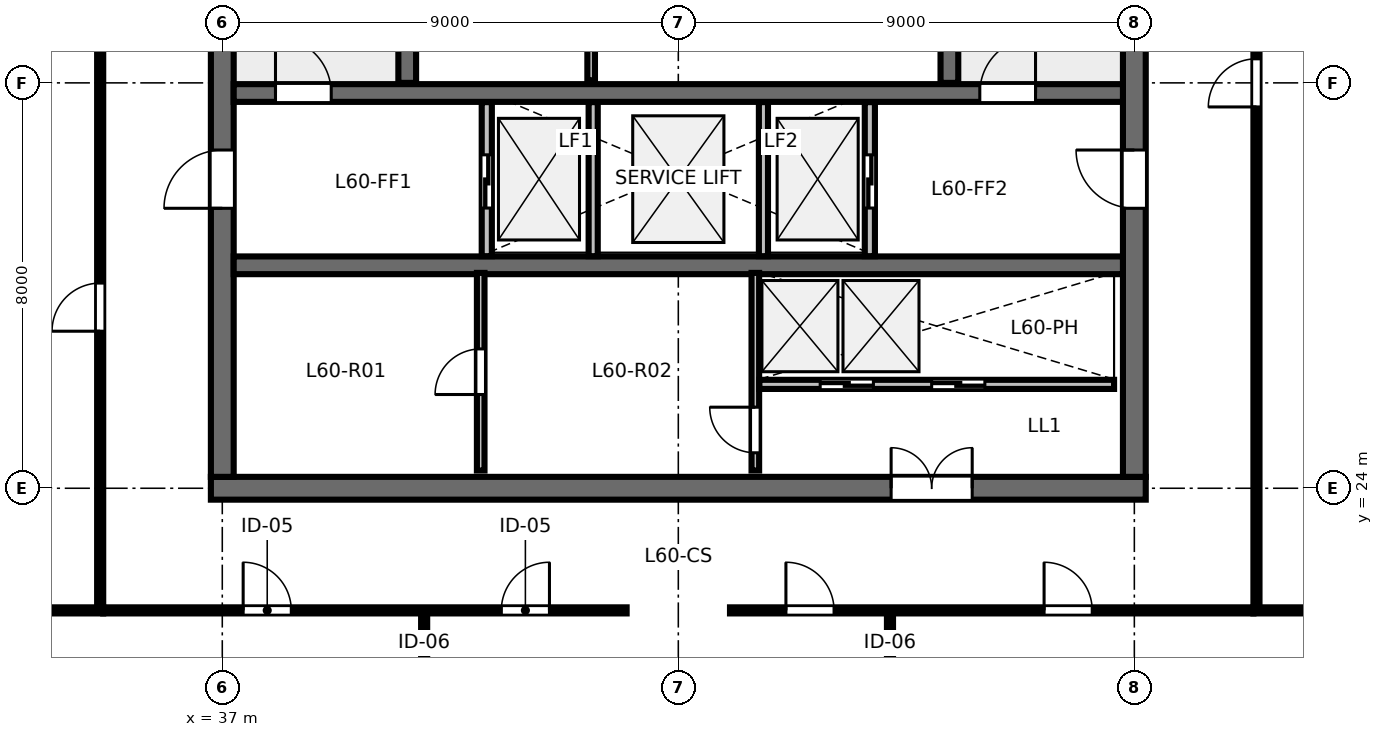
"""IFC4 building model, lengths in metres.
Left out: names, types, materials, properties, quantities, classifications, styles, units other than length and angle.
Written with IfcOpenShell. Run it as: python <this file> out.ifc"""

import sys

from ifc_helpers import new_model, si_unit, direction, frame, frame_2d, origin, place, context, subcontext, project, spatial, rectangle, extrude, element, fill, save


model = new_model("IFC4")
c1 = context("Model", 3, precision=1e-05, world=origin(), true_north=direction((0.0, 1.0)))
c2 = subcontext(c1, "Body", "Model", "MODEL_VIEW")
j1 = project(units=[si_unit("LENGTHUNIT", "METRE"), si_unit("PLANEANGLEUNIT", "RADIAN")], contexts=[c1])
p1 = place(None, origin())
s1 = spatial("IfcSite", under=j1, at=p1, CompositionType="ELEMENT")
p2 = place(p1, origin())
s2 = spatial("IfcBuilding", under=s1, at=p2, CompositionType="ELEMENT")
p3 = place(p2, frame((0.0, 0.0, 227.4)))
s3 = spatial("IfcBuildingStorey", under=s2, at=p3, CompositionType="ELEMENT", Elevation=227.4)
p4 = place(p3, frame((36.775, 24.0, 0.0), z_axis=(0.0, 0.0, 1.0), x_axis=(1.0, 0.0, 0.0)))
e1 = element("IfcWall", 1, at=p4, inside=s3, PredefinedType="SHEAR", context=c2, shape_type="SweptSolid", body=[
    extrude(rectangle(XDim=18.45, YDim=0.45, at=frame_2d((9.225, 0.0))), origin(), (0.0, 0.0, 1.0), 3.36),
])
p5 = place(p4, frame((13.425, 0.0, 0.0)))
e2 = element("IfcOpeningElement", 2, at=p5, cuts=e1, PredefinedType="OPENING", context=c2, shape_type="SweptSolid", body=[
    extrude(rectangle(XDim=1.6, YDim=2.15, at=frame_2d((0.8, 1.075))), frame((0.0, 0.235, 0.0), z_axis=(0.0, -1.0, 0.0), x_axis=(1.0, 0.0, 0.0)), (0.0, 0.0, 1.0), 0.47),
])
p6 = place(p3, frame((37.0, 24.225, 0.0), z_axis=(0.0, 0.0, 1.0), x_axis=(0.0, 1.0, 0.0)))
e3 = element("IfcWall", 3, at=p6, inside=s3, PredefinedType="SHEAR", context=c2, shape_type="SweptSolid", body=[
    extrude(rectangle(XDim=15.55, YDim=0.45, at=frame_2d((7.775, 0.0))), origin(), (0.0, 0.0, 1.0), 3.36),
])
p7 = place(p6, frame((5.3, 0.0, 0.0)))
e4 = element("IfcOpeningElement", 4, at=p7, cuts=e3, PredefinedType="OPENING", context=c2, shape_type="SweptSolid", body=[
    extrude(rectangle(XDim=1.15, YDim=2.15, at=frame_2d((0.575, 1.075))), frame((0.0, 0.235, 0.0), z_axis=(0.0, -1.0, 0.0), x_axis=(1.0, 0.0, 0.0)), (0.0, 0.0, 1.0), 0.47),
])
p8 = place(p3, frame((55.0, 24.225, 0.0), z_axis=(0.0, 0.0, 1.0), x_axis=(0.0, 1.0, 0.0)))
e5 = element("IfcWall", 5, at=p8, inside=s3, PredefinedType="SHEAR", context=c2, shape_type="SweptSolid", body=[
    extrude(rectangle(XDim=15.55, YDim=0.45, at=frame_2d((7.775, 0.0))), origin(), (0.0, 0.0, 1.0), 3.36),
])
p9 = place(p8, frame((5.3, 0.0, 0.0)))
e6 = element("IfcOpeningElement", 6, at=p9, cuts=e5, PredefinedType="OPENING", context=c2, shape_type="SweptSolid", body=[
    extrude(rectangle(XDim=1.15, YDim=2.15, at=frame_2d((0.575, 1.075))), frame((0.0, 0.235, 0.0), z_axis=(0.0, -1.0, 0.0), x_axis=(1.0, 0.0, 0.0)), (0.0, 0.0, 1.0), 0.47),
])
p10 = place(p3, frame((37.225, 31.8, 0.0), z_axis=(0.0, 0.0, 1.0), x_axis=(1.0, 0.0, 0.0)))
e7 = element("IfcWall", 7, at=p10, inside=s3, PredefinedType="SHEAR", context=c2, shape_type="SweptSolid", body=[
    extrude(rectangle(XDim=17.55, YDim=0.35, at=frame_2d((8.775, 0.0))), origin(), (0.0, 0.0, 1.0), 3.36),
])
p11 = place(p10, frame((0.825, 0.0, 0.0)))
e8 = element("IfcOpeningElement", 8, at=p11, cuts=e7, PredefinedType="OPENING", context=c2, shape_type="SweptSolid", body=[
    extrude(rectangle(XDim=1.1, YDim=2.15, at=frame_2d((0.55, 1.075))), frame((0.0, 0.185, 0.0), z_axis=(0.0, -1.0, 0.0), x_axis=(1.0, 0.0, 0.0)), (0.0, 0.0, 1.0), 0.37),
])
p12 = place(p10, frame((14.725, 0.0, 0.0)))
e9 = element("IfcOpeningElement", 9, at=p12, cuts=e7, PredefinedType="OPENING", context=c2, shape_type="SweptSolid", body=[
    extrude(rectangle(XDim=1.1, YDim=2.15, at=frame_2d((0.55, 1.075))), frame((0.0, 0.185, 0.0), z_axis=(0.0, -1.0, 0.0), x_axis=(1.0, 0.0, 0.0)), (0.0, 0.0, 1.0), 0.37),
])
p13 = place(p3, frame((37.225, 28.4, 0.0), z_axis=(0.0, 0.0, 1.0), x_axis=(1.0, 0.0, 0.0)))
e10 = element("IfcWall", 10, at=p13, inside=s3, PredefinedType="SHEAR", context=c2, shape_type="SweptSolid", body=[
    extrude(rectangle(XDim=17.55, YDim=0.35, at=frame_2d((8.775, 0.0))), origin(), (0.0, 0.0, 1.0), 3.36),
])
for number, where, z_axis, x_axis in (
    (11, (40.65, 32.0, 0.0), (0.0, 0.0, 1.0), (0.0, 1.0, 0.0)),
    (12, (51.35, 32.0, 0.0), (0.0, 0.0, 1.0), (0.0, 1.0, 0.0)),
):
    element("IfcWall", number, at=place(p3, frame(where, z_axis=z_axis, x_axis=x_axis)), inside=s3, PredefinedType="SHEAR", context=c2, shape_type="SweptSolid", body=[
        extrude(rectangle(XDim=7.7, YDim=0.35, at=frame_2d((3.85, 0.0))), origin(), (0.0, 0.0, 1.0), 3.6),
    ])
p14 = place(p3, frame((44.28, 32.05, 0.0), z_axis=(0.0, 0.0, 1.0), x_axis=(0.0, 1.0, 0.0)))
e13 = element("IfcWall", 13, at=p14, inside=s3, PredefinedType="PARTITIONING", context=c2, shape_type="SweptSolid", body=[
    extrude(rectangle(XDim=3.67, YDim=0.15, at=frame_2d((1.835, 0.0))), origin(), (0.0, 0.0, 1.0), 3.375),
])
p15 = place(p14, frame((1.35, 0.0, 0.0)))
e14 = element("IfcOpeningElement", 14, at=p15, cuts=e13, PredefinedType="OPENING", context=c2, shape_type="SweptSolid", body=[
    extrude(rectangle(XDim=0.92, YDim=2.15, at=frame_2d((0.46, 1.075))), frame((0.0, 0.085, 0.0), z_axis=(0.0, -1.0, 0.0), x_axis=(1.0, 0.0, 0.0)), (0.0, 0.0, 1.0), 0.17),
])
p16 = place(p3, frame((42.22, 28.58, 0.0), z_axis=(0.0, 0.0, 1.0), x_axis=(0.0, 1.0, 0.0)))
e15 = element("IfcWall", 15, at=p16, inside=s3, PredefinedType="PARTITIONING", context=c2, shape_type="SweptSolid", body=[
    extrude(rectangle(XDim=3.04, YDim=0.2, at=frame_2d((1.52, 0.0))), origin(), (0.0, 0.0, 1.0), 3.375),
])
p17 = place(p16, frame((0.95, 0.0, 0.0)))
e16 = element("IfcOpeningElement", 16, at=p17, cuts=e15, PredefinedType="OPENING", context=c2, shape_type="SweptSolid", body=[
    extrude(rectangle(XDim=1.05, YDim=2.15, at=frame_2d((0.525, 1.075))), frame((0.0, 0.11, 0.0), z_axis=(0.0, -1.0, 0.0), x_axis=(1.0, 0.0, 0.0)), (0.0, 0.0, 1.0), 0.22),
])
p18 = place(p3, frame((49.78, 28.58, 0.0), z_axis=(0.0, 0.0, 1.0), x_axis=(0.0, 1.0, 0.0)))
e17 = element("IfcWall", 17, at=p18, inside=s3, PredefinedType="PARTITIONING", context=c2, shape_type="SweptSolid", body=[
    extrude(rectangle(XDim=3.04, YDim=0.2, at=frame_2d((1.52, 0.0))), origin(), (0.0, 0.0, 1.0), 3.375),
])
p19 = place(p18, frame((0.95, 0.0, 0.0)))
e18 = element("IfcOpeningElement", 18, at=p19, cuts=e17, PredefinedType="OPENING", context=c2, shape_type="SweptSolid", body=[
    extrude(rectangle(XDim=1.05, YDim=2.15, at=frame_2d((0.525, 1.075))), frame((0.0, 0.11, 0.0), z_axis=(0.0, -1.0, 0.0), x_axis=(1.0, 0.0, 0.0)), (0.0, 0.0, 1.0), 0.22),
])
for number, where, z_axis, x_axis in (
    (19, (44.32, 28.58, 0.0), (0.0, 0.0, 1.0), (0.0, 1.0, 0.0)),
    (20, (47.68, 28.58, 0.0), (0.0, 0.0, 1.0), (0.0, 1.0, 0.0)),
):
    element("IfcWall", number, at=place(p3, frame(where, z_axis=z_axis, x_axis=x_axis)), inside=s3, PredefinedType="PARTITIONING", context=c2, shape_type="SweptSolid", body=[
        extrude(rectangle(XDim=3.04, YDim=0.18, at=frame_2d((1.52, 0.0))), origin(), (0.0, 0.0, 1.0), 3.375),
    ])
p20 = place(p3, frame((42.1, 24.35, 0.0), z_axis=(0.0, 0.0, 1.0), x_axis=(0.0, 1.0, 0.0)))
e21 = element("IfcWall", 21, at=p20, inside=s3, PredefinedType="PARTITIONING", context=c2, shape_type="SweptSolid", body=[
    extrude(rectangle(XDim=3.9, YDim=0.15, at=frame_2d((1.95, 0.0))), origin(), (0.0, 0.0, 1.0), 3.375),
])
p21 = place(p20, frame((1.5, 0.0, 0.0)))
e22 = element("IfcOpeningElement", 22, at=p21, cuts=e21, PredefinedType="OPENING", context=c2, shape_type="SweptSolid", body=[
    extrude(rectangle(XDim=0.9, YDim=2.15, at=frame_2d((0.45, 1.075))), frame((0.0, 0.085, 0.0), z_axis=(0.0, -1.0, 0.0), x_axis=(1.0, 0.0, 0.0)), (0.0, 0.0, 1.0), 0.17),
])
p22 = place(p3, frame((47.52, 24.35, 0.0), z_axis=(0.0, 0.0, 1.0), x_axis=(0.0, 1.0, 0.0)))
e23 = element("IfcWall", 23, at=p22, inside=s3, PredefinedType="PARTITIONING", context=c2, shape_type="SweptSolid", body=[
    extrude(rectangle(XDim=3.9, YDim=0.15, at=frame_2d((1.95, 0.0))), origin(), (0.0, 0.0, 1.0), 3.375),
])
p23 = place(p22, frame((0.35, 0.0, 0.0)))
e24 = element("IfcOpeningElement", 24, at=p23, cuts=e23, PredefinedType="OPENING", context=c2, shape_type="SweptSolid", body=[
    extrude(rectangle(XDim=0.9, YDim=2.15, at=frame_2d((0.45, 1.075))), frame((0.0, 0.085, 0.0), z_axis=(0.0, -1.0, 0.0), x_axis=(1.0, 0.0, 0.0)), (0.0, 0.0, 1.0), 0.17),
])
p24 = place(p3, frame((47.6, 26.05, 0.0), z_axis=(0.0, 0.0, 1.0), x_axis=(1.0, 0.0, 0.0)))
e25 = element("IfcWall", 25, at=p24, inside=s3, PredefinedType="PARTITIONING", context=c2, shape_type="SweptSolid", body=[
    extrude(rectangle(XDim=7.0, YDim=0.18, at=frame_2d((3.5, 0.0))), origin(), (0.0, 0.0, 1.0), 3.375),
])
p25 = place(p24, frame((1.2, 0.0, 0.0)))
e26 = element("IfcOpeningElement", 26, at=p25, cuts=e25, PredefinedType="OPENING", context=c2, shape_type="SweptSolid", body=[
    extrude(rectangle(XDim=1.05, YDim=2.15, at=frame_2d((0.525, 1.075))), frame((0.0, 0.1, 0.0), z_axis=(0.0, -1.0, 0.0), x_axis=(1.0, 0.0, 0.0)), (0.0, 0.0, 1.0), 0.2),
])
p26 = place(p24, frame((3.4, 0.0, 0.0)))
e27 = element("IfcOpeningElement", 27, at=p26, cuts=e25, PredefinedType="OPENING", context=c2, shape_type="SweptSolid", body=[
    extrude(rectangle(XDim=1.05, YDim=2.15, at=frame_2d((0.525, 1.075))), frame((0.0, 0.1, 0.0), z_axis=(0.0, -1.0, 0.0), x_axis=(1.0, 0.0, 0.0)), (0.0, 0.0, 1.0), 0.2),
])
p27 = place(p3, frame((40.984, 21.59, 0.0), z_axis=(0.0, 0.0, 1.0), x_axis=(0.0, -1.0, 0.0)))
e28 = element("IfcWall", 28, at=p27, inside=s3, PredefinedType="PARTITIONING", context=c2, shape_type="SweptSolid", body=[
    extrude(rectangle(XDim=7.137, YDim=0.12, at=frame_2d((3.569, 0.0))), origin(), (0.0, 0.0, 1.0), 2.655),
])
p28 = place(p27, frame((1.4, 0.0, 0.0)))
e29 = element("IfcOpeningElement", 29, at=p28, cuts=e28, PredefinedType="OPENING", context=c2, shape_type="SweptSolid", body=[
    extrude(rectangle(XDim=0.9, YDim=2.15, at=frame_2d((0.45, 1.075))), frame((0.0, 0.07, 0.0), z_axis=(0.0, -1.0, 0.0), x_axis=(1.0, 0.0, 0.0)), (0.0, 0.0, 1.0), 0.14),
])
p29 = place(p3, frame((50.177, 21.59, 0.0), z_axis=(0.0, 0.0, 1.0), x_axis=(0.0, -1.0, 0.0)))
e30 = element("IfcWall", 30, at=p29, inside=s3, PredefinedType="PARTITIONING", context=c2, shape_type="SweptSolid", body=[
    extrude(rectangle(XDim=7.137, YDim=0.12, at=frame_2d((3.569, 0.0))), origin(), (0.0, 0.0, 1.0), 2.655),
])
p30 = place(p29, frame((1.4, 0.0, 0.0)))
e31 = element("IfcOpeningElement", 31, at=p30, cuts=e30, PredefinedType="OPENING", context=c2, shape_type="SweptSolid", body=[
    extrude(rectangle(XDim=0.9, YDim=2.15, at=frame_2d((0.45, 1.075))), frame((0.0, 0.07, 0.0), z_axis=(0.0, -1.0, 0.0), x_axis=(1.0, 0.0, 0.0)), (0.0, 0.0, 1.0), 0.14),
])
p31 = place(p3, frame((34.65, 21.59, 0.0), z_axis=(0.0, 0.0, 1.0), x_axis=(1.0, 0.0, 0.0)))
e32 = element("IfcWall", 32, at=p31, inside=s3, PredefinedType="PARTITIONING", context=c2, shape_type="SweptSolid", body=[
    extrude(rectangle(XDim=10.33, YDim=0.12, at=frame_2d((5.165, 0.0))), origin(), (0.0, 0.0, 1.0), 2.655),
])
p32 = place(p31, frame((2.762, 0.0, 0.0)))
e33 = element("IfcOpeningElement", 33, at=p32, cuts=e32, PredefinedType="OPENING", context=c2, shape_type="SweptSolid", body=[
    extrude(rectangle(XDim=0.95, YDim=2.15, at=frame_2d((0.475, 1.075))), frame((0.0, 0.07, 0.0), z_axis=(0.0, -1.0, 0.0), x_axis=(1.0, 0.0, 0.0)), (0.0, 0.0, 1.0), 0.14),
])
p33 = place(p31, frame((7.857, 0.0, 0.0)))
e34 = element("IfcOpeningElement", 34, at=p33, cuts=e32, PredefinedType="OPENING", context=c2, shape_type="SweptSolid", body=[
    extrude(rectangle(XDim=0.95, YDim=2.15, at=frame_2d((0.475, 1.075))), frame((0.0, 0.07, 0.0), z_axis=(0.0, -1.0, 0.0), x_axis=(1.0, 0.0, 0.0)), (0.0, 0.0, 1.0), 0.14),
])
p34 = place(p3, frame((47.02, 21.59, 0.0), z_axis=(0.0, 0.0, 1.0), x_axis=(1.0, 0.0, 0.0)))
e35 = element("IfcWall", 35, at=p34, inside=s3, PredefinedType="PARTITIONING", context=c2, shape_type="SweptSolid", body=[
    extrude(rectangle(XDim=10.33, YDim=0.12, at=frame_2d((5.165, 0.0))), origin(), (0.0, 0.0, 1.0), 2.655),
])
p35 = place(p34, frame((1.104, 0.0, 0.0)))
e36 = element("IfcOpeningElement", 36, at=p35, cuts=e35, PredefinedType="OPENING", context=c2, shape_type="SweptSolid", body=[
    extrude(rectangle(XDim=0.95, YDim=2.15, at=frame_2d((0.475, 1.075))), frame((0.0, 0.07, 0.0), z_axis=(0.0, -1.0, 0.0), x_axis=(1.0, 0.0, 0.0)), (0.0, 0.0, 1.0), 0.14),
])
p36 = place(p34, frame((6.199, 0.0, 0.0)))
e37 = element("IfcOpeningElement", 37, at=p36, cuts=e35, PredefinedType="OPENING", context=c2, shape_type="SweptSolid", body=[
    extrude(rectangle(XDim=0.95, YDim=2.15, at=frame_2d((0.475, 1.075))), frame((0.0, 0.07, 0.0), z_axis=(0.0, -1.0, 0.0), x_axis=(1.0, 0.0, 0.0)), (0.0, 0.0, 1.0), 0.14),
])
p37 = place(p3, frame((34.59, 21.65, 0.0), z_axis=(0.0, 0.0, 1.0), x_axis=(0.0, 1.0, 0.0)))
e38 = element("IfcWall", 38, at=p37, inside=s3, PredefinedType="PARTITIONING", context=c2, shape_type="SweptSolid", body=[
    extrude(rectangle(XDim=20.7, YDim=0.12, at=frame_2d((10.35, 0.0))), origin(), (0.0, 0.0, 1.0), 2.655),
])
p38 = place(p37, frame((5.449, 0.0, 0.0)))
e39 = element("IfcOpeningElement", 39, at=p38, cuts=e38, PredefinedType="OPENING", context=c2, shape_type="SweptSolid", body=[
    extrude(rectangle(XDim=0.95, YDim=2.15, at=frame_2d((0.475, 1.075))), frame((0.0, 0.07, 0.0), z_axis=(0.0, -1.0, 0.0), x_axis=(1.0, 0.0, 0.0)), (0.0, 0.0, 1.0), 0.14),
])
p39 = place(p37, frame((15.599, 0.0, 0.0)))
e40 = element("IfcOpeningElement", 40, at=p39, cuts=e38, PredefinedType="OPENING", context=c2, shape_type="SweptSolid", body=[
    extrude(rectangle(XDim=0.95, YDim=2.15, at=frame_2d((0.475, 1.075))), frame((0.0, 0.07, 0.0), z_axis=(0.0, -1.0, 0.0), x_axis=(1.0, 0.0, 0.0)), (0.0, 0.0, 1.0), 0.14),
])
p40 = place(p3, frame((57.41, 21.65, 0.0), z_axis=(0.0, 0.0, 1.0), x_axis=(0.0, 1.0, 0.0)))
e41 = element("IfcWall", 41, at=p40, inside=s3, PredefinedType="PARTITIONING", context=c2, shape_type="SweptSolid", body=[
    extrude(rectangle(XDim=20.7, YDim=0.12, at=frame_2d((10.35, 0.0))), origin(), (0.0, 0.0, 1.0), 2.655),
])
p41 = place(p40, frame((9.875, 0.0, 0.0)))
e42 = element("IfcOpeningElement", 42, at=p41, cuts=e41, PredefinedType="OPENING", context=c2, shape_type="SweptSolid", body=[
    extrude(rectangle(XDim=0.95, YDim=2.15, at=frame_2d((0.475, 1.075))), frame((0.0, 0.07, 0.0), z_axis=(0.0, -1.0, 0.0), x_axis=(1.0, 0.0, 0.0)), (0.0, 0.0, 1.0), 0.14),
])
for number, where, z_axis, x_axis in (
    (43, (34.65, 21.59, 0.0), (0.0, 0.0, 1.0), (-1.0, 0.0, 0.0)),
    (44, (57.35, 21.59, 0.0), (0.0, 0.0, 1.0), (1.0, 0.0, 0.0)),
):
    element("IfcWall", number, at=place(p3, frame(where, z_axis=z_axis, x_axis=x_axis)), inside=s3, PredefinedType="PARTITIONING", context=c2, shape_type="SweptSolid", body=[
        extrude(rectangle(XDim=8.243, YDim=0.12, at=frame_2d((4.121, 0.0))), origin(), (0.0, 0.0, 1.0), 2.655),
    ])
p42 = place(p11, origin())
e45 = element("IfcDoor", 45, at=p42, inside=s3, OperationType="SINGLE_SWING_LEFT", PredefinedType="DOOR", context=c2, shape_type="SweptSolid", body=[
    extrude(rectangle(XDim=1.1, YDim=2.15, at=frame_2d((0.55, 1.075))), frame((0.0, 0.025, 0.0), z_axis=(0.0, -1.0, 0.0), x_axis=(1.0, 0.0, 0.0)), (0.0, 0.0, 1.0), 0.05),
])
fill(e8, e45)
p43 = place(p12, origin())
e46 = element("IfcDoor", 46, at=p43, inside=s3, OperationType="SINGLE_SWING_RIGHT", PredefinedType="DOOR", context=c2, shape_type="SweptSolid", body=[
    extrude(rectangle(XDim=1.1, YDim=2.15, at=frame_2d((0.55, 1.075))), frame((0.0, 0.025, 0.0), z_axis=(0.0, -1.0, 0.0), x_axis=(1.0, 0.0, 0.0)), (0.0, 0.0, 1.0), 0.05),
])
fill(e9, e46)
p44 = place(p7, origin())
e47 = element("IfcDoor", 47, at=p44, inside=s3, OperationType="SINGLE_SWING_LEFT", PredefinedType="DOOR", context=c2, shape_type="SweptSolid", body=[
    extrude(rectangle(XDim=1.15, YDim=2.15, at=frame_2d((0.575, 1.075))), frame((0.0, 0.025, 0.0), z_axis=(0.0, -1.0, 0.0), x_axis=(1.0, 0.0, 0.0)), (0.0, 0.0, 1.0), 0.05),
])
fill(e4, e47)
p45 = place(p9, origin())
e48 = element("IfcDoor", 48, at=p45, inside=s3, OperationType="SINGLE_SWING_RIGHT", PredefinedType="DOOR", context=c2, shape_type="SweptSolid", body=[
    extrude(rectangle(XDim=1.15, YDim=2.15, at=frame_2d((0.575, 1.075))), frame((0.0, 0.025, 0.0), z_axis=(0.0, -1.0, 0.0), x_axis=(1.0, 0.0, 0.0)), (0.0, 0.0, 1.0), 0.05),
])
fill(e6, e48)
p46 = place(p5, origin())
e49 = element("IfcDoor", 49, at=p46, inside=s3, OperationType="DOUBLE_DOOR_SINGLE_SWING", PredefinedType="DOOR", context=c2, shape_type="SweptSolid", body=[
    extrude(rectangle(XDim=1.6, YDim=2.15, at=frame_2d((0.8, 1.075))), frame((0.0, 0.025, 0.0), z_axis=(0.0, -1.0, 0.0), x_axis=(1.0, 0.0, 0.0)), (0.0, 0.0, 1.0), 0.05),
])
fill(e2, e49)
p47 = place(p17, origin())
e50 = element("IfcDoor", 50, at=p47, inside=s3, OperationType="SLIDING_TO_LEFT", PredefinedType="DOOR", context=c2, shape_type="SweptSolid", body=[
    extrude(rectangle(XDim=1.05, YDim=2.15, at=frame_2d((0.525, 1.075))), frame((0.0, 0.025, 0.0), z_axis=(0.0, -1.0, 0.0), x_axis=(1.0, 0.0, 0.0)), (0.0, 0.0, 1.0), 0.05),
])
fill(e16, e50)
p48 = place(p19, origin())
e51 = element("IfcDoor", 51, at=p48, inside=s3, OperationType="SLIDING_TO_RIGHT", PredefinedType="DOOR", context=c2, shape_type="SweptSolid", body=[
    extrude(rectangle(XDim=1.05, YDim=2.15, at=frame_2d((0.525, 1.075))), frame((0.0, 0.025, 0.0), z_axis=(0.0, -1.0, 0.0), x_axis=(1.0, 0.0, 0.0)), (0.0, 0.0, 1.0), 0.05),
])
fill(e18, e51)
p49 = place(p21, origin())
e52 = element("IfcDoor", 52, at=p49, inside=s3, OperationType="SINGLE_SWING_LEFT", PredefinedType="DOOR", context=c2, shape_type="SweptSolid", body=[
    extrude(rectangle(XDim=0.9, YDim=2.15, at=frame_2d((0.45, 1.075))), frame((0.0, 0.025, 0.0), z_axis=(0.0, -1.0, 0.0), x_axis=(1.0, 0.0, 0.0)), (0.0, 0.0, 1.0), 0.05),
])
fill(e22, e52)
p50 = place(p23, origin())
e53 = element("IfcDoor", 53, at=p50, inside=s3, OperationType="SINGLE_SWING_RIGHT", PredefinedType="DOOR", context=c2, shape_type="SweptSolid", body=[
    extrude(rectangle(XDim=0.9, YDim=2.15, at=frame_2d((0.45, 1.075))), frame((0.0, 0.025, 0.0), z_axis=(0.0, -1.0, 0.0), x_axis=(1.0, 0.0, 0.0)), (0.0, 0.0, 1.0), 0.05),
])
fill(e24, e53)
p51 = place(p25, origin())
e54 = element("IfcDoor", 54, at=p51, inside=s3, OperationType="SLIDING_TO_LEFT", PredefinedType="DOOR", context=c2, shape_type="SweptSolid", body=[
    extrude(rectangle(XDim=1.05, YDim=2.15, at=frame_2d((0.525, 1.075))), frame((0.0, 0.025, 0.0), z_axis=(0.0, -1.0, 0.0), x_axis=(1.0, 0.0, 0.0)), (0.0, 0.0, 1.0), 0.05),
])
fill(e26, e54)
p52 = place(p26, origin())
e55 = element("IfcDoor", 55, at=p52, inside=s3, OperationType="SLIDING_TO_RIGHT", PredefinedType="DOOR", context=c2, shape_type="SweptSolid", body=[
    extrude(rectangle(XDim=1.05, YDim=2.15, at=frame_2d((0.525, 1.075))), frame((0.0, 0.025, 0.0), z_axis=(0.0, -1.0, 0.0), x_axis=(1.0, 0.0, 0.0)), (0.0, 0.0, 1.0), 0.05),
])
fill(e27, e55)
p53 = place(p32, origin())
e56 = element("IfcDoor", 56, at=p53, inside=s3, OperationType="SINGLE_SWING_LEFT", PredefinedType="DOOR", context=c2, shape_type="SweptSolid", body=[
    extrude(rectangle(XDim=0.95, YDim=2.15, at=frame_2d((0.475, 1.075))), frame((0.0, 0.025, 0.0), z_axis=(0.0, -1.0, 0.0), x_axis=(1.0, 0.0, 0.0)), (0.0, 0.0, 1.0), 0.05),
])
fill(e33, e56)
p54 = place(p33, origin())
e57 = element("IfcDoor", 57, at=p54, inside=s3, OperationType="SINGLE_SWING_RIGHT", PredefinedType="DOOR", context=c2, shape_type="SweptSolid", body=[
    extrude(rectangle(XDim=0.95, YDim=2.15, at=frame_2d((0.475, 1.075))), frame((0.0, 0.025, 0.0), z_axis=(0.0, -1.0, 0.0), x_axis=(1.0, 0.0, 0.0)), (0.0, 0.0, 1.0), 0.05),
])
fill(e34, e57)
p55 = place(p35, origin())
e58 = element("IfcDoor", 58, at=p55, inside=s3, OperationType="SINGLE_SWING_LEFT", PredefinedType="DOOR", context=c2, shape_type="SweptSolid", body=[
    extrude(rectangle(XDim=0.95, YDim=2.15, at=frame_2d((0.475, 1.075))), frame((0.0, 0.025, 0.0), z_axis=(0.0, -1.0, 0.0), x_axis=(1.0, 0.0, 0.0)), (0.0, 0.0, 1.0), 0.05),
])
fill(e36, e58)
p56 = place(p36, origin())
e59 = element("IfcDoor", 59, at=p56, inside=s3, OperationType="SINGLE_SWING_LEFT", PredefinedType="DOOR", context=c2, shape_type="SweptSolid", body=[
    extrude(rectangle(XDim=0.95, YDim=2.15, at=frame_2d((0.475, 1.075))), frame((0.0, 0.025, 0.0), z_axis=(0.0, -1.0, 0.0), x_axis=(1.0, 0.0, 0.0)), (0.0, 0.0, 1.0), 0.05),
])
fill(e37, e59)
p57 = place(p38, origin())
e60 = element("IfcDoor", 60, at=p57, inside=s3, OperationType="SINGLE_SWING_LEFT", PredefinedType="DOOR", context=c2, shape_type="SweptSolid", body=[
    extrude(rectangle(XDim=0.95, YDim=2.15, at=frame_2d((0.475, 1.075))), frame((0.0, 0.025, 0.0), z_axis=(0.0, -1.0, 0.0), x_axis=(1.0, 0.0, 0.0)), (0.0, 0.0, 1.0), 0.05),
])
fill(e39, e60)
p58 = place(p41, origin())
e61 = element("IfcDoor", 61, at=p58, inside=s3, OperationType="SINGLE_SWING_LEFT", PredefinedType="DOOR", context=c2, shape_type="SweptSolid", body=[
    extrude(rectangle(XDim=0.95, YDim=2.15, at=frame_2d((0.475, 1.075))), frame((0.0, 0.025, 0.0), z_axis=(0.0, -1.0, 0.0), x_axis=(1.0, 0.0, 0.0)), (0.0, 0.0, 1.0), 0.05),
])
fill(e42, e61)
save(model, sys.argv[1])
